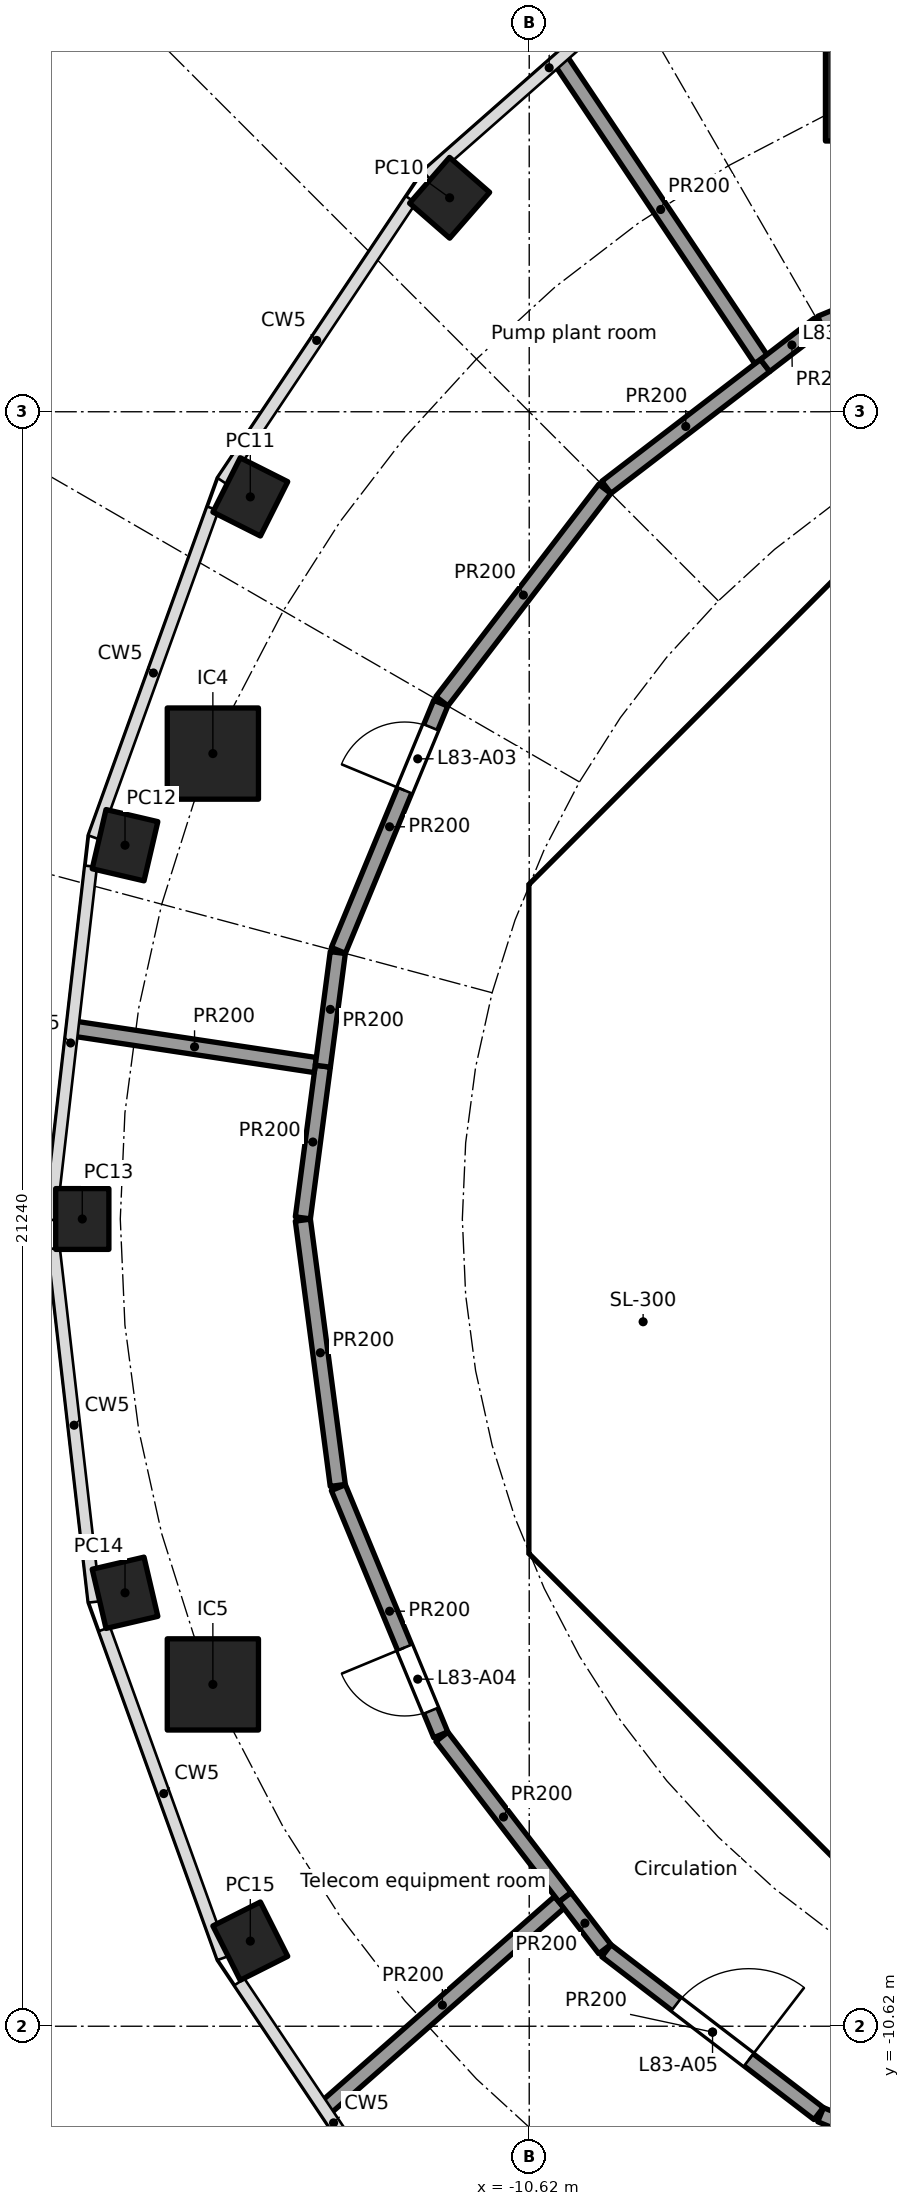
"""IFC4 building model, lengths in metres.
Left out: names, types, materials, properties, quantities, classifications, styles, units other than length and angle.
Written with IfcOpenShell. Run it as: python <this file> out.ifc"""

import sys

from ifc_helpers import new_model, si_unit, direction, frame, frame_2d, origin, origin_2d, place, context, subcontext, project, spatial, polyline, rectangle, hollow_rectangle, outline, extrude, element, fill, save


model = new_model("IFC4")
c1 = context("Model", 3, precision=1e-05, world=origin(), true_north=direction((0.0, 1.0)))
c2 = subcontext(c1, "Body", "Model", "MODEL_VIEW")
j1 = project(units=[si_unit("LENGTHUNIT", "METRE"), si_unit("PLANEANGLEUNIT", "RADIAN")], contexts=[c1])
p1 = place(None, origin())
s1 = spatial("IfcSite", under=j1, at=p1, CompositionType="ELEMENT")
p2 = place(p1, origin())
s2 = spatial("IfcBuilding", under=s1, at=p2, CompositionType="ELEMENT")
p3 = place(p2, frame((0.0, 0.0, 336.9)))
s3 = spatial("IfcBuildingStorey", under=s2, at=p3, CompositionType="ELEMENT", Elevation=336.9)
for number, where, z_axis, x_axis in (
    (1, (-11.667, 13.435, 0.0), (0.0, 0.0, 1.0), (-0.657, -0.754, 0.0)),
    (2, (-14.289, 9.5, 0.0), (0.0, 0.0, 1.0), (-0.45, -0.893, 0.0)),
    (3, (-15.938, 4.917, 0.0), (0.0, 0.0, 1.0), (-0.227, -0.974, 0.0)),
    (4, (-16.5, 0.0, 0.0), (0.0, 0.0, 1.0), (0.0, -1.0, 0.0)),
    (5, (-15.938, -4.917, 0.0), (0.0, 0.0, 1.0), (0.227, -0.974, 0.0)),
    (6, (-14.289, -9.5, 0.0), (0.0, 0.0, 1.0), (0.45, -0.893, 0.0)),
):
    element("IfcColumn", number, at=place(p3, frame(where, z_axis=z_axis, x_axis=x_axis)), inside=s3, PredefinedType="COLUMN", context=c2, shape_type="SweptSolid", body=[
        extrude(hollow_rectangle(XDim=0.8, YDim=0.7, WallThickness=0.025, at=origin_2d()), origin(), (0.0, 0.0, 1.0), 4.0),
    ])
for number, where, z_axis, x_axis in (
    (7, (-6.123, 14.782, 0.0), (0.0, 0.0, 1.0), (1.0, 0.0, 0.0)),
    (8, (-14.782, 6.123, 0.0), (0.0, 0.0, 1.0), (1.0, 0.0, 0.0)),
    (9, (-14.782, -6.123, 0.0), (0.0, 0.0, 1.0), (1.0, 0.0, 0.0)),
):
    element("IfcColumn", number, at=place(p3, frame(where, z_axis=z_axis, x_axis=x_axis)), inside=s3, PredefinedType="COLUMN", context=c2, shape_type="SweptSolid", body=[
        extrude(rectangle(XDim=1.2, YDim=1.2, at=origin_2d()), origin(), (0.0, 0.0, 1.0), 4.0),
    ])
p4 = place(p3, frame((-4.613, 9.988, 0.0), z_axis=(0.0, 0.0, 1.0), x_axis=(-0.707106781187, -0.707106781187, 0.0)))
e10 = element("IfcWall", 10, at=p4, inside=s3, PredefinedType="SHEAR", context=c2, shape_type="SweptSolid", body=[
    extrude(rectangle(XDim=7.602, YDim=0.6, at=frame_2d((3.801, 0.0))), origin(), (0.0, 0.0, 1.0), 3.7),
])
p5 = place(p4, frame((0.351, 0.0, 0.0)))
e11 = element("IfcOpeningElement", 11, at=p5, cuts=e10, PredefinedType="OPENING", context=c2, shape_type="SweptSolid", body=[
    extrude(rectangle(XDim=1.1, YDim=2.1, at=frame_2d((0.55, 1.05))), frame((0.0, 0.31, 0.0), z_axis=(0.0, -1.0, 0.0), x_axis=(1.0, 0.0, 0.0)), (0.0, 0.0, 1.0), 0.62),
])
p6 = place(p3, frame((-10.325, 3.801, 0.0), z_axis=(0.0, 0.0, 1.0), x_axis=(0.0, -1.0, 0.0)))
e12 = element("IfcWall", 12, at=p6, inside=s3, PredefinedType="SHEAR", context=c2, shape_type="SweptSolid", body=[
    extrude(rectangle(XDim=7.602, YDim=0.6, at=frame_2d((3.801, 0.0))), origin(), (0.0, 0.0, 1.0), 3.7),
])
p7 = place(p6, frame((0.651, 0.0, 0.0)))
e13 = element("IfcOpeningElement", 13, at=p7, cuts=e12, PredefinedType="OPENING", context=c2, shape_type="SweptSolid", body=[
    extrude(rectangle(XDim=1.5, YDim=2.1, at=frame_2d((0.75, 1.05))), frame((0.0, 0.31, 0.0), z_axis=(0.0, -1.0, 0.0), x_axis=(1.0, 0.0, 0.0)), (0.0, 0.0, 1.0), 0.62),
])
p8 = place(p6, frame((5.451, 0.0, 0.0)))
e14 = element("IfcOpeningElement", 14, at=p8, cuts=e12, PredefinedType="OPENING", context=c2, shape_type="SweptSolid", body=[
    extrude(rectangle(XDim=1.5, YDim=2.1, at=frame_2d((0.75, 1.05))), frame((0.0, 0.31, 0.0), z_axis=(0.0, -1.0, 0.0), x_axis=(1.0, 0.0, 0.0)), (0.0, 0.0, 1.0), 0.62),
])
p9 = place(p3, frame((-9.988, -4.613, 0.0), z_axis=(0.0, 0.0, 1.0), x_axis=(0.707106781187, -0.707106781187, 0.0)))
e15 = element("IfcWall", 15, at=p9, inside=s3, PredefinedType="SHEAR", context=c2, shape_type="SweptSolid", body=[
    extrude(rectangle(XDim=7.602, YDim=0.6, at=frame_2d((3.801, 0.0))), origin(), (0.0, 0.0, 1.0), 3.7),
])
p10 = place(p9, frame((6.151, 0.0, 0.0)))
e16 = element("IfcOpeningElement", 16, at=p10, cuts=e15, PredefinedType="OPENING", context=c2, shape_type="SweptSolid", body=[
    extrude(rectangle(XDim=1.1, YDim=2.1, at=frame_2d((0.55, 1.05))), frame((0.0, 0.31, 0.0), z_axis=(0.0, -1.0, 0.0), x_axis=(1.0, 0.0, 0.0)), (0.0, 0.0, 1.0), 0.62),
])
p11 = place(p3, frame((-6.7, 2.0, 0.0), z_axis=(0.0, 0.0, 1.0), x_axis=(1.0, 0.0, 0.0)))
e17 = element("IfcWall", 17, at=p11, inside=s3, PredefinedType="SOLIDWALL", context=c2, shape_type="SweptSolid", body=[
    extrude(rectangle(XDim=13.4, YDim=0.2, at=frame_2d((6.7, 0.0))), origin(), (0.0, 0.0, 1.0), 3.7),
])
p12 = place(p11, frame((2.95, 0.0, 0.0)))
e18 = element("IfcOpeningElement", 18, at=p12, cuts=e17, PredefinedType="OPENING", context=c2, shape_type="SweptSolid", body=[
    extrude(rectangle(XDim=0.9, YDim=2.1, at=frame_2d((0.45, 1.05))), frame((0.0, 0.11, 0.0), z_axis=(0.0, -1.0, 0.0), x_axis=(1.0, 0.0, 0.0)), (0.0, 0.0, 1.0), 0.22),
])
p13 = place(p11, frame((8.45, 0.0, 0.0)))
e19 = element("IfcOpeningElement", 19, at=p13, cuts=e17, PredefinedType="OPENING", context=c2, shape_type="SweptSolid", body=[
    extrude(rectangle(XDim=0.9, YDim=2.1, at=frame_2d((0.45, 1.05))), frame((0.0, 0.11, 0.0), z_axis=(0.0, -1.0, 0.0), x_axis=(1.0, 0.0, 0.0)), (0.0, 0.0, 1.0), 0.22),
])
p14 = place(p11, frame((11.75, 0.0, 0.0)))
e20 = element("IfcOpeningElement", 20, at=p14, cuts=e17, PredefinedType="OPENING", context=c2, shape_type="SweptSolid", body=[
    extrude(rectangle(XDim=0.9, YDim=2.1, at=frame_2d((0.45, 1.05))), frame((0.0, 0.11, 0.0), z_axis=(0.0, -1.0, 0.0), x_axis=(1.0, 0.0, 0.0)), (0.0, 0.0, 1.0), 0.22),
])
p15 = place(p3, frame((-7.0, -7.027, 0.0), z_axis=(0.0, 0.0, 1.0), x_axis=(0.0, 1.0, 0.0)))
e21 = element("IfcWall", 21, at=p15, inside=s3, PredefinedType="PARTITIONING", context=c2, shape_type="SweptSolid", body=[
    extrude(rectangle(XDim=2.927, YDim=0.15, at=frame_2d((1.463, 0.0))), origin(), (0.0, 0.0, 1.0), 3.7),
])
p16 = place(p15, frame((0.976, 0.0, 0.0)))
e22 = element("IfcOpeningElement", 22, at=p16, cuts=e21, PredefinedType="OPENING", context=c2, shape_type="SweptSolid", body=[
    extrude(rectangle(XDim=0.9, YDim=2.1, at=frame_2d((0.45, 1.05))), frame((0.0, 0.085, 0.0), z_axis=(0.0, -1.0, 0.0), x_axis=(1.0, 0.0, 0.0)), (0.0, 0.0, 1.0), 0.17),
])
p17 = place(p3, frame((-6.7, -2.0, 0.0), z_axis=(0.0, 0.0, 1.0), x_axis=(1.0, 0.0, 0.0)))
e23 = element("IfcWall", 23, at=p17, inside=s3, PredefinedType="SOLIDWALL", context=c2, shape_type="SweptSolid", body=[
    extrude(rectangle(XDim=13.4, YDim=0.2, at=frame_2d((6.7, 0.0))), origin(), (0.0, 0.0, 1.0), 3.7),
])
p18 = place(p17, frame((1.85, 0.0, 0.0)))
e24 = element("IfcOpeningElement", 24, at=p18, cuts=e23, PredefinedType="OPENING", context=c2, shape_type="SweptSolid", body=[
    extrude(rectangle(XDim=0.9, YDim=2.1, at=frame_2d((0.45, 1.05))), frame((0.0, 0.11, 0.0), z_axis=(0.0, -1.0, 0.0), x_axis=(1.0, 0.0, 0.0)), (0.0, 0.0, 1.0), 0.22),
])
p19 = place(p17, frame((6.25, 0.0, 0.0)))
e25 = element("IfcOpeningElement", 25, at=p19, cuts=e23, PredefinedType="OPENING", context=c2, shape_type="SweptSolid", body=[
    extrude(rectangle(XDim=0.9, YDim=2.1, at=frame_2d((0.45, 1.05))), frame((0.0, 0.11, 0.0), z_axis=(0.0, -1.0, 0.0), x_axis=(1.0, 0.0, 0.0)), (0.0, 0.0, 1.0), 0.22),
])
p20 = place(p17, frame((10.65, 0.0, 0.0)))
e26 = element("IfcOpeningElement", 26, at=p20, cuts=e23, PredefinedType="OPENING", context=c2, shape_type="SweptSolid", body=[
    extrude(rectangle(XDim=0.9, YDim=2.1, at=frame_2d((0.45, 1.05))), frame((0.0, 0.11, 0.0), z_axis=(0.0, -1.0, 0.0), x_axis=(1.0, 0.0, 0.0)), (0.0, 0.0, 1.0), 0.22),
])
p21 = place(p3, origin())
e27 = element("IfcWall", 27, at=p21, inside=s3, PredefinedType="SHEAR", context=c2, shape_type="SweptSolid", body=[
    extrude(outline(polyline([(-10.625, -3.801), (-10.025, -3.801), (-10.025, -4.152), (-9.776, -4.401), (-10.2, -4.825), (-10.625, -4.401), (-10.625, -3.801)])), origin(), (0.0, 0.0, 1.0), 3.7),
])
p22 = place(p3, origin())
e28 = element("IfcWall", 28, at=p22, inside=s3, PredefinedType="SHEAR", context=c2, shape_type="SweptSolid", body=[
    extrude(outline(polyline([(-10.2, 4.825), (-9.776, 4.401), (-10.025, 4.152), (-10.025, 3.801), (-10.625, 3.801), (-10.625, 4.401), (-10.2, 4.825)])), origin(), (0.0, 0.0, 1.0), 3.7),
])
p23 = place(p3, origin())
e29 = element("IfcWall", 29, at=p23, inside=s3, PredefinedType="SOLIDWALL", context=c2, shape_type="SweptSolid", body=[
    extrude(outline(polyline([(-6.7, -2.1), (-6.5, -2.1), (-6.5, -4.1), (-2.3, -4.1), (-2.3, -2.1), (-2.1, -2.1), (-2.1, -4.1), (2.1, -4.1), (2.1, -2.1), (2.3, -2.1), (2.3, -4.1), (6.5, -4.1), (6.5, -2.1), (6.7, -2.1), (6.7, -4.3), (-6.7, -4.3), (-6.7, -2.1)])), origin(), (0.0, 0.0, 1.0), 3.7),
])
p24 = place(p3, origin())
e30 = element("IfcWall", 30, at=p24, inside=s3, PredefinedType="SOLIDWALL", context=c2, shape_type="SweptSolid", body=[
    extrude(outline(polyline([(-6.7, 4.3), (6.7, 4.3), (6.7, 2.1), (6.5, 2.1), (6.5, 4.1), (4.5, 4.1), (4.5, 2.1), (4.3, 2.1), (4.3, 4.1), (0.1, 4.1), (0.1, 2.1), (-0.1, 2.1), (-0.1, 4.1), (-6.5, 4.1), (-6.5, 2.1), (-6.7, 2.1), (-6.7, 4.3)])), origin(), (0.0, 0.0, 1.0), 3.7),
])
for number, where, z_axis, x_axis in (
    (31, (-10.025, -4.0, 0.0), (0.0, 0.0, 1.0), (1.0, 0.0, 0.0)),
    (32, (-10.025, 4.0, 0.0), (0.0, 0.0, 1.0), (1.0, 0.0, 0.0)),
):
    element("IfcWall", number, at=place(p3, frame(where, z_axis=z_axis, x_axis=x_axis)), inside=s3, PredefinedType="PARTITIONING", context=c2, shape_type="SweptSolid", body=[
        extrude(rectangle(XDim=3.325, YDim=0.2, at=frame_2d((1.662, 0.0))), origin(), (0.0, 0.0, 1.0), 3.7),
    ])
p25 = place(p3, frame((-13.598, 0.015, 0.0), z_axis=(0.0, 0.0, 1.0), x_axis=(0.130526685544, 0.991444796426, 0.0)))
e33 = element("IfcWall", 33, at=p25, inside=s3, PredefinedType="PARTITIONING", context=c2, shape_type="SweptSolid", body=[
    extrude(rectangle(XDim=2.013, YDim=0.2, at=frame_2d((1.006, 0.0))), origin(), (0.0, 0.0, 1.0), 3.7),
])
p26 = place(p3, frame((-13.434, 2.025, 0.0), z_axis=(0.0, 0.0, 1.0), x_axis=(-0.988817905908, 0.149127961685, 0.0)))
e34 = element("IfcWall", 34, at=p26, inside=s3, PredefinedType="PARTITIONING", context=c2, shape_type="SweptSolid", body=[
    extrude(rectangle(XDim=3.214, YDim=0.2, at=frame_2d((1.607, 0.0))), origin(), (0.0, 0.0, 1.0), 3.7),
])
p27 = place(p3, frame((-13.335, 2.01, 0.0), z_axis=(0.0, 0.0, 1.0), x_axis=(0.130391662061, 0.99146256332, 0.0)))
e35 = element("IfcWall", 35, at=p27, inside=s3, PredefinedType="PARTITIONING", context=c2, shape_type="SweptSolid", body=[
    extrude(rectangle(XDim=1.507, YDim=0.2, at=frame_2d((0.754, 0.0))), origin(), (0.0, 0.0, 1.0), 3.7),
])
p28 = place(p3, frame((-13.139, -3.505, 0.0), z_axis=(0.0, 0.0, 1.0), x_axis=(-0.130468866457, 0.991452406768, 0.0)))
e36 = element("IfcWall", 36, at=p28, inside=s3, PredefinedType="PARTITIONING", context=c2, shape_type="SweptSolid", body=[
    extrude(rectangle(XDim=3.52, YDim=0.2, at=frame_2d((1.76, 0.0))), origin(), (0.0, 0.0, 1.0), 3.7),
])
p29 = place(p3, frame((-13.131, 3.534, 0.0), z_axis=(0.0, 0.0, 1.0), x_axis=(0.382723413813, 0.92386297064, 0.0)))
e37 = element("IfcWall", 37, at=p29, inside=s3, PredefinedType="PARTITIONING", context=c2, shape_type="SweptSolid", body=[
    extrude(rectangle(XDim=3.52, YDim=0.2, at=frame_2d((1.76, 0.0))), origin(), (0.0, 0.0, 1.0), 3.7),
])
p30 = place(p29, frame((2.278, 0.0, 0.0)))
e38 = element("IfcOpeningElement", 38, at=p30, cuts=e37, PredefinedType="OPENING", context=c2, shape_type="SweptSolid", body=[
    extrude(rectangle(XDim=0.9, YDim=2.1, at=frame_2d((0.45, 1.05))), frame((0.0, 0.11, 0.0), z_axis=(0.0, -1.0, 0.0), x_axis=(1.0, 0.0, 0.0)), (0.0, 0.0, 1.0), 0.22),
])
p31 = place(p3, frame((-11.784, -6.786, 0.0), z_axis=(0.0, 0.0, 1.0), x_axis=(-0.382723413813, 0.92386297064, 0.0)))
e39 = element("IfcWall", 39, at=p31, inside=s3, PredefinedType="PARTITIONING", context=c2, shape_type="SweptSolid", body=[
    extrude(rectangle(XDim=3.52, YDim=0.2, at=frame_2d((1.76, 0.0))), origin(), (0.0, 0.0, 1.0), 3.7),
])
p32 = place(p31, frame((0.342, 0.0, 0.0)))
e40 = element("IfcOpeningElement", 40, at=p32, cuts=e39, PredefinedType="OPENING", context=c2, shape_type="SweptSolid", body=[
    extrude(rectangle(XDim=0.9, YDim=2.1, at=frame_2d((0.45, 1.05))), frame((0.0, 0.11, 0.0), z_axis=(0.0, -1.0, 0.0), x_axis=(1.0, 0.0, 0.0)), (0.0, 0.0, 1.0), 0.22),
])
p33 = place(p3, frame((-11.769, 6.812, 0.0), z_axis=(0.0, 0.0, 1.0), x_axis=(0.608697977542, 0.793402024283, 0.0)))
e41 = element("IfcWall", 41, at=p33, inside=s3, PredefinedType="PARTITIONING", context=c2, shape_type="SweptSolid", body=[
    extrude(rectangle(XDim=3.52, YDim=0.2, at=frame_2d((1.76, 0.0))), origin(), (0.0, 0.0, 1.0), 3.7),
])
p34 = place(p3, frame((-10.224, -8.989, 0.0), z_axis=(0.0, 0.0, 1.0), x_axis=(-0.750994766266, -0.660308156122, 0.0)))
e42 = element("IfcWall", 42, at=p34, inside=s3, PredefinedType="PARTITIONING", context=c2, shape_type="SweptSolid", body=[
    extrude(rectangle(XDim=4.097, YDim=0.2, at=frame_2d((2.049, 0.0))), origin(), (0.0, 0.0, 1.0), 3.7),
])
p35 = place(p3, frame((-10.149, -8.923, 0.0), z_axis=(0.0, 0.0, 1.0), x_axis=(-0.608699260048, 0.793401040343, 0.0)))
e43 = element("IfcWall", 43, at=p35, inside=s3, PredefinedType="PARTITIONING", context=c2, shape_type="SweptSolid", body=[
    extrude(rectangle(XDim=2.661, YDim=0.2, at=frame_2d((1.331, 0.0))), origin(), (0.0, 0.0, 1.0), 3.7),
])
p36 = place(p3, frame((-9.626, -9.605, 0.0), z_axis=(0.0, 0.0, 1.0), x_axis=(-0.608694005511, 0.793405071609, 0.0)))
e44 = element("IfcWall", 44, at=p36, inside=s3, PredefinedType="PARTITIONING", context=c2, shape_type="SweptSolid", body=[
    extrude(rectangle(XDim=0.859, YDim=0.2, at=frame_2d((0.43, 0.0))), origin(), (0.0, 0.0, 1.0), 3.7),
])
p37 = place(p3, frame((-9.605, 9.626, 0.0), z_axis=(0.0, 0.0, 1.0), x_axis=(0.793395797287, 0.608706093979, 0.0)))
e45 = element("IfcWall", 45, at=p37, inside=s3, PredefinedType="PARTITIONING", context=c2, shape_type="SweptSolid", body=[
    extrude(rectangle(XDim=2.632, YDim=0.2, at=frame_2d((1.316, 0.0))), origin(), (0.0, 0.0, 1.0), 3.7),
])
p38 = place(p3, frame((-7.572, 11.311, 0.0), z_axis=(0.0, 0.0, 1.0), x_axis=(-0.55629198168, 0.830986901893, 0.0)))
e46 = element("IfcWall", 46, at=p38, inside=s3, PredefinedType="PARTITIONING", context=c2, shape_type="SweptSolid", body=[
    extrude(rectangle(XDim=4.74, YDim=0.2, at=frame_2d((2.37, 0.0))), origin(), (0.0, 0.0, 1.0), 3.7),
])
p39 = place(p3, frame((-7.517, 11.228, 0.0), z_axis=(0.0, 0.0, 1.0), x_axis=(0.793420478802, 0.608673922407, 0.0)))
e47 = element("IfcWall", 47, at=p39, inside=s3, PredefinedType="PARTITIONING", context=c2, shape_type="SweptSolid", body=[
    extrude(rectangle(XDim=0.888, YDim=0.2, at=frame_2d((0.444, 0.0))), origin(), (0.0, 0.0, 1.0), 3.7),
])
p40 = place(p3, frame((-6.812, -11.769, 0.0), z_axis=(0.0, 0.0, 1.0), x_axis=(-0.793402024283, 0.608697977542, 0.0)))
e48 = element("IfcWall", 48, at=p40, inside=s3, PredefinedType="PARTITIONING", context=c2, shape_type="SweptSolid", body=[
    extrude(rectangle(XDim=3.52, YDim=0.2, at=frame_2d((1.76, 0.0))), origin(), (0.0, 0.0, 1.0), 3.7),
])
p41 = place(p40, frame((1.16, 0.0, 0.0)))
e49 = element("IfcOpeningElement", 49, at=p41, cuts=e48, PredefinedType="OPENING", context=c2, shape_type="SweptSolid", body=[
    extrude(rectangle(XDim=1.2, YDim=2.1, at=frame_2d((0.6, 1.05))), frame((0.0, 0.11, 0.0), z_axis=(0.0, -1.0, 0.0), x_axis=(1.0, 0.0, 0.0)), (0.0, 0.0, 1.0), 0.22),
])
p42 = place(p3, frame((-6.786, 11.784, 0.0), z_axis=(0.0, 0.0, 1.0), x_axis=(0.92386297064, 0.382723413813, 0.0)))
e50 = element("IfcWall", 50, at=p42, inside=s3, PredefinedType="PARTITIONING", context=c2, shape_type="SweptSolid", body=[
    extrude(rectangle(XDim=3.52, YDim=0.2, at=frame_2d((1.76, 0.0))), origin(), (0.0, 0.0, 1.0), 3.7),
])
p43 = place(p42, frame((0.342, 0.0, 0.0)))
e51 = element("IfcOpeningElement", 51, at=p43, cuts=e50, PredefinedType="OPENING", context=c2, shape_type="SweptSolid", body=[
    extrude(rectangle(XDim=0.9, YDim=2.1, at=frame_2d((0.45, 1.05))), frame((0.0, 0.11, 0.0), z_axis=(0.0, -1.0, 0.0), x_axis=(1.0, 0.0, 0.0)), (0.0, 0.0, 1.0), 0.22),
])
p44 = place(p3, frame((-3.534, -13.131, 0.0), z_axis=(0.0, 0.0, 1.0), x_axis=(-0.92386297064, 0.382723413813, 0.0)))
e52 = element("IfcWall", 52, at=p44, inside=s3, PredefinedType="PARTITIONING", context=c2, shape_type="SweptSolid", body=[
    extrude(rectangle(XDim=3.52, YDim=0.2, at=frame_2d((1.76, 0.0))), origin(), (0.0, 0.0, 1.0), 3.7),
])
p45 = place(p16, origin())
e53 = element("IfcDoor", 53, at=p45, inside=s3, OperationType="SINGLE_SWING_LEFT", PredefinedType="DOOR", context=c2, shape_type="SweptSolid", body=[
    extrude(rectangle(XDim=0.9, YDim=2.1, at=frame_2d((0.45, 1.05))), frame((0.0, 0.025, 0.0), z_axis=(0.0, -1.0, 0.0), x_axis=(1.0, 0.0, 0.0)), (0.0, 0.0, 1.0), 0.05),
])
fill(e22, e53)
p46 = place(p7, origin())
e54 = element("IfcDoor", 54, at=p46, inside=s3, OperationType="DOUBLE_DOOR_SINGLE_SWING", PredefinedType="DOOR", context=c2, shape_type="SweptSolid", body=[
    extrude(rectangle(XDim=1.5, YDim=2.1, at=frame_2d((0.75, 1.05))), frame((0.0, 0.025, 0.0), z_axis=(0.0, -1.0, 0.0), x_axis=(1.0, 0.0, 0.0)), (0.0, 0.0, 1.0), 0.05),
])
fill(e13, e54)
p47 = place(p8, origin())
e55 = element("IfcDoor", 55, at=p47, inside=s3, OperationType="DOUBLE_DOOR_SINGLE_SWING", PredefinedType="DOOR", context=c2, shape_type="SweptSolid", body=[
    extrude(rectangle(XDim=1.5, YDim=2.1, at=frame_2d((0.75, 1.05))), frame((0.0, 0.025, 0.0), z_axis=(0.0, -1.0, 0.0), x_axis=(1.0, 0.0, 0.0)), (0.0, 0.0, 1.0), 0.05),
])
fill(e14, e55)
p48 = place(p30, origin())
e56 = element("IfcDoor", 56, at=p48, inside=s3, OperationType="SINGLE_SWING_LEFT", PredefinedType="DOOR", context=c2, shape_type="SweptSolid", body=[
    extrude(rectangle(XDim=0.9, YDim=2.1, at=frame_2d((0.45, 1.05))), frame((0.0, 0.025, 0.0), z_axis=(0.0, -1.0, 0.0), x_axis=(1.0, 0.0, 0.0)), (0.0, 0.0, 1.0), 0.05),
])
fill(e38, e56)
p49 = place(p32, origin())
e57 = element("IfcDoor", 57, at=p49, inside=s3, OperationType="SINGLE_SWING_RIGHT", PredefinedType="DOOR", context=c2, shape_type="SweptSolid", body=[
    extrude(rectangle(XDim=0.9, YDim=2.1, at=frame_2d((0.45, 1.05))), frame((0.0, 0.025, 0.0), z_axis=(0.0, -1.0, 0.0), x_axis=(1.0, 0.0, 0.0)), (0.0, 0.0, 1.0), 0.05),
])
fill(e40, e57)
p50 = place(p41, frame((1.2, 0.0, 0.0), x_axis=(-1.0, 0.0, 0.0)))
e58 = element("IfcDoor", 58, at=p50, inside=s3, OperationType="SINGLE_SWING_RIGHT", PredefinedType="DOOR", context=c2, shape_type="SweptSolid", body=[
    extrude(rectangle(XDim=1.2, YDim=2.1, at=frame_2d((0.6, 1.05))), frame((0.0, 0.025, 0.0), z_axis=(0.0, -1.0, 0.0), x_axis=(1.0, 0.0, 0.0)), (0.0, 0.0, 1.0), 0.05),
])
fill(e49, e58)
save(model, sys.argv[1])
